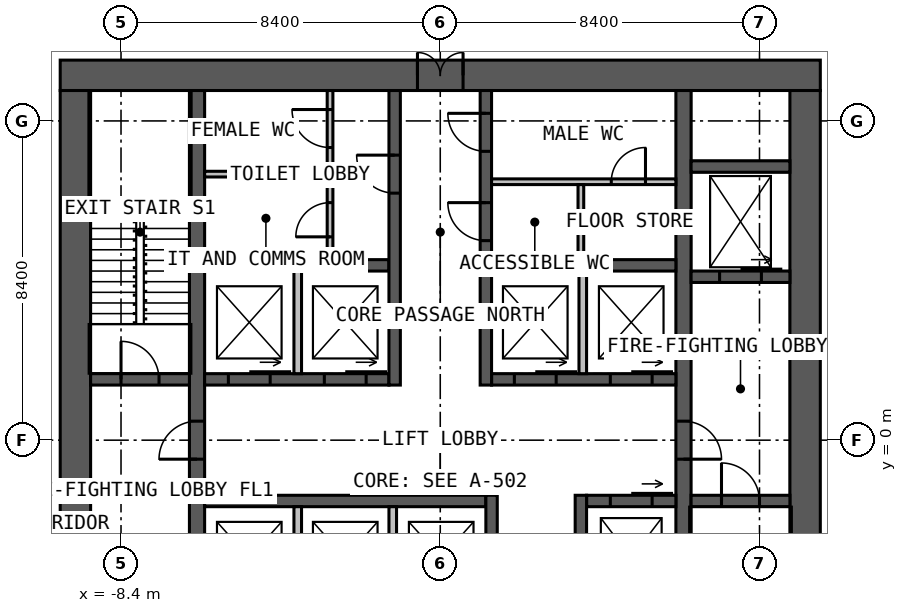
"""IFC4 building model, lengths in metres.
Left out: names, types, materials, properties, quantities, classifications, styles, units other than length and angle.
Written with IfcOpenShell. Run it as: python <this file> out.ifc"""

import sys

from ifc_helpers import new_model, si_unit, direction, frame, frame_2d, origin, place, context, subcontext, project, spatial, rectangle, extrude, element, fill, save


model = new_model("IFC4")
c1 = context("Model", 3, precision=1e-05, world=origin(), true_north=direction((0.0, 1.0)))
c2 = subcontext(c1, "Body", "Model", "MODEL_VIEW")
j1 = project(units=[si_unit("LENGTHUNIT", "METRE"), si_unit("PLANEANGLEUNIT", "RADIAN")], contexts=[c1])
p1 = place(None, origin())
s1 = spatial("IfcSite", under=j1, at=p1, CompositionType="ELEMENT")
p2 = place(p1, origin())
s2 = spatial("IfcBuilding", under=s1, at=p2, CompositionType="ELEMENT")
p3 = place(p2, frame((0.0, 0.0, 25.0)))
s3 = spatial("IfcBuildingStorey", under=s2, at=p3, CompositionType="ELEMENT", Elevation=25.0)
p4 = place(p3, frame((-10.0, 9.6, 0.0), z_axis=(0.0, 0.0, 1.0), x_axis=(1.0, 0.0, 0.0)))
e1 = element("IfcWall", 1, at=p4, inside=s3, PredefinedType="SOLIDWALL", context=c2, shape_type="SweptSolid", body=[
    extrude(rectangle(XDim=20.0, YDim=0.8, at=frame_2d((10.0, 0.0))), origin(), (0.0, 0.0, 1.0), 4.0),
])
p5 = place(p4, frame((9.4, 0.0, 0.0)))
e2 = element("IfcOpeningElement", 2, at=p5, cuts=e1, PredefinedType="OPENING", context=c2, shape_type="SweptSolid", body=[
    extrude(rectangle(XDim=1.2, YDim=2.2, at=frame_2d((0.6, 1.1))), frame((0.0, 0.41, 0.0), z_axis=(0.0, -1.0, 0.0), x_axis=(1.0, 0.0, 0.0)), (0.0, 0.0, 1.0), 0.82),
])
for number, where, z_axis, x_axis in (
    (3, (9.6, -9.2, 0.0), (0.0, 0.0, 1.0), (0.0, 1.0, 0.0)),
    (4, (-9.6, 9.2, 0.0), (0.0, 0.0, 1.0), (0.0, -1.0, 0.0)),
):
    element("IfcWall", number, at=place(p3, frame(where, z_axis=z_axis, x_axis=x_axis)), inside=s3, PredefinedType="SOLIDWALL", context=c2, shape_type="SweptSolid", body=[
        extrude(rectangle(XDim=18.4, YDim=0.8, at=frame_2d((9.2, 0.0))), origin(), (0.0, 0.0, 1.0), 4.0),
    ])
p6 = place(p3, frame((-6.4, -9.2, 0.0), z_axis=(0.0, 0.0, 1.0), x_axis=(0.0, 1.0, 0.0)))
e5 = element("IfcWall", 5, at=p6, inside=s3, PredefinedType="SOLIDWALL", context=c2, shape_type="SweptSolid", body=[
    extrude(rectangle(XDim=18.4, YDim=0.4, at=frame_2d((9.2, 0.0))), origin(), (0.0, 0.0, 1.0), 4.0),
])
p7 = place(p6, frame((8.7, 0.0, 0.0)))
e6 = element("IfcOpeningElement", 6, at=p7, cuts=e5, PredefinedType="OPENING", context=c2, shape_type="SweptSolid", body=[
    extrude(rectangle(XDim=1.0, YDim=2.2, at=frame_2d((0.5, 1.1))), frame((0.0, 0.21, 0.0), z_axis=(0.0, -1.0, 0.0), x_axis=(1.0, 0.0, 0.0)), (0.0, 0.0, 1.0), 0.42),
])
p8 = place(p3, frame((6.4, 9.2, 0.0), z_axis=(0.0, 0.0, 1.0), x_axis=(0.0, -1.0, 0.0)))
e7 = element("IfcWall", 7, at=p8, inside=s3, PredefinedType="SOLIDWALL", context=c2, shape_type="SweptSolid", body=[
    extrude(rectangle(XDim=18.4, YDim=0.4, at=frame_2d((9.2, 0.0))), origin(), (0.0, 0.0, 1.0), 4.0),
])
p9 = place(p8, frame((8.7, 0.0, 0.0)))
e8 = element("IfcOpeningElement", 8, at=p9, cuts=e7, PredefinedType="OPENING", context=c2, shape_type="SweptSolid", body=[
    extrude(rectangle(XDim=1.0, YDim=2.2, at=frame_2d((0.5, 1.1))), frame((0.0, 0.21, 0.0), z_axis=(0.0, -1.0, 0.0), x_axis=(1.0, 0.0, 0.0)), (0.0, 0.0, 1.0), 0.42),
])
p10 = place(p3, frame((-6.2, 1.6, 0.0), z_axis=(0.0, 0.0, 1.0), x_axis=(1.0, 0.0, 0.0)))
e9 = element("IfcWall", 9, at=p10, inside=s3, PredefinedType="SOLIDWALL", context=c2, shape_type="SweptSolid", body=[
    extrude(rectangle(XDim=4.85, YDim=0.3, at=frame_2d((2.425, 0.0))), origin(), (0.0, 0.0, 1.0), 4.0),
])
p11 = place(p10, frame((0.625, 0.0, 0.0)))
e10 = element("IfcOpeningElement", 10, at=p11, cuts=e9, PredefinedType="OPENING", context=c2, shape_type="SweptSolid", body=[
    extrude(rectangle(XDim=1.1, YDim=2.2, at=frame_2d((0.55, 1.1))), frame((0.0, 0.16, 0.0), z_axis=(0.0, -1.0, 0.0), x_axis=(1.0, 0.0, 0.0)), (0.0, 0.0, 1.0), 0.32),
])
p12 = place(p10, frame((3.15, 0.0, 0.0)))
e11 = element("IfcOpeningElement", 11, at=p12, cuts=e9, PredefinedType="OPENING", context=c2, shape_type="SweptSolid", body=[
    extrude(rectangle(XDim=1.1, YDim=2.2, at=frame_2d((0.55, 1.1))), frame((0.0, 0.16, 0.0), z_axis=(0.0, -1.0, 0.0), x_axis=(1.0, 0.0, 0.0)), (0.0, 0.0, 1.0), 0.32),
])
p13 = place(p3, frame((1.35, 1.6, 0.0), z_axis=(0.0, 0.0, 1.0), x_axis=(1.0, 0.0, 0.0)))
e12 = element("IfcWall", 12, at=p13, inside=s3, PredefinedType="SOLIDWALL", context=c2, shape_type="SweptSolid", body=[
    extrude(rectangle(XDim=4.85, YDim=0.3, at=frame_2d((2.425, 0.0))), origin(), (0.0, 0.0, 1.0), 4.0),
])
p14 = place(p13, frame((0.6, 0.0, 0.0)))
e13 = element("IfcOpeningElement", 13, at=p14, cuts=e12, PredefinedType="OPENING", context=c2, shape_type="SweptSolid", body=[
    extrude(rectangle(XDim=1.1, YDim=2.2, at=frame_2d((0.55, 1.1))), frame((0.0, 0.16, 0.0), z_axis=(0.0, -1.0, 0.0), x_axis=(1.0, 0.0, 0.0)), (0.0, 0.0, 1.0), 0.32),
])
p15 = place(p13, frame((3.125, 0.0, 0.0)))
e14 = element("IfcOpeningElement", 14, at=p15, cuts=e12, PredefinedType="OPENING", context=c2, shape_type="SweptSolid", body=[
    extrude(rectangle(XDim=1.1, YDim=2.2, at=frame_2d((0.55, 1.1))), frame((0.0, 0.16, 0.0), z_axis=(0.0, -1.0, 0.0), x_axis=(1.0, 0.0, 0.0)), (0.0, 0.0, 1.0), 0.32),
])
for number, where, z_axis, x_axis in (
    (15, (-6.2, 4.6, 0.0), (0.0, 0.0, 1.0), (1.0, 0.0, 0.0)),
    (16, (1.35, 4.6, 0.0), (0.0, 0.0, 1.0), (1.0, 0.0, 0.0)),
):
    element("IfcWall", number, at=place(p3, frame(where, z_axis=z_axis, x_axis=x_axis)), inside=s3, PredefinedType="SOLIDWALL", context=c2, shape_type="SweptSolid", body=[
        extrude(rectangle(XDim=4.85, YDim=0.3, at=frame_2d((2.425, 0.0))), origin(), (0.0, 0.0, 1.0), 4.0),
    ])
p16 = place(p3, frame((-1.2, 1.45, 0.0), z_axis=(0.0, 0.0, 1.0), x_axis=(0.0, 1.0, 0.0)))
e17 = element("IfcWall", 17, at=p16, inside=s3, PredefinedType="SOLIDWALL", context=c2, shape_type="SweptSolid", body=[
    extrude(rectangle(XDim=7.75, YDim=0.3, at=frame_2d((3.875, 0.0))), origin(), (0.0, 0.0, 1.0), 4.0),
])
p17 = place(p16, frame((5.05, 0.0, 0.0)))
e18 = element("IfcOpeningElement", 18, at=p17, cuts=e17, PredefinedType="OPENING", context=c2, shape_type="SweptSolid", body=[
    extrude(rectangle(XDim=1.0, YDim=2.2, at=frame_2d((0.5, 1.1))), frame((0.0, 0.16, 0.0), z_axis=(0.0, -1.0, 0.0), x_axis=(1.0, 0.0, 0.0)), (0.0, 0.0, 1.0), 0.32),
])
p18 = place(p3, frame((1.2, 1.45, 0.0), z_axis=(0.0, 0.0, 1.0), x_axis=(0.0, 1.0, 0.0)))
e19 = element("IfcWall", 19, at=p18, inside=s3, PredefinedType="SOLIDWALL", context=c2, shape_type="SweptSolid", body=[
    extrude(rectangle(XDim=7.75, YDim=0.3, at=frame_2d((3.875, 0.0))), origin(), (0.0, 0.0, 1.0), 4.0),
])
p19 = place(p18, frame((3.8, 0.0, 0.0)))
e20 = element("IfcOpeningElement", 20, at=p19, cuts=e19, PredefinedType="OPENING", context=c2, shape_type="SweptSolid", body=[
    extrude(rectangle(XDim=1.0, YDim=2.2, at=frame_2d((0.5, 1.1))), frame((0.0, 0.16, 0.0), z_axis=(0.0, -1.0, 0.0), x_axis=(1.0, 0.0, 0.0)), (0.0, 0.0, 1.0), 0.32),
])
p20 = place(p18, frame((6.15, 0.0, 0.0)))
e21 = element("IfcOpeningElement", 21, at=p20, cuts=e19, PredefinedType="OPENING", context=c2, shape_type="SweptSolid", body=[
    extrude(rectangle(XDim=1.0, YDim=2.2, at=frame_2d((0.5, 1.1))), frame((0.0, 0.16, 0.0), z_axis=(0.0, -1.0, 0.0), x_axis=(1.0, 0.0, 0.0)), (0.0, 0.0, 1.0), 0.32),
])
p21 = place(p3, frame((-6.2, -1.6, 0.0), z_axis=(0.0, 0.0, 1.0), x_axis=(1.0, 0.0, 0.0)))
e22 = element("IfcWall", 22, at=p21, inside=s3, PredefinedType="SOLIDWALL", context=c2, shape_type="SweptSolid", body=[
    extrude(rectangle(XDim=7.4, YDim=0.3, at=frame_2d((3.7, 0.0))), origin(), (0.0, 0.0, 1.0), 4.0),
])
p22 = place(p3, frame((3.85, -1.6, 0.0), z_axis=(0.0, 0.0, 1.0), x_axis=(1.0, 0.0, 0.0)))
e23 = element("IfcWall", 23, at=p22, inside=s3, PredefinedType="SOLIDWALL", context=c2, shape_type="SweptSolid", body=[
    extrude(rectangle(XDim=2.35, YDim=0.3, at=frame_2d((1.175, 0.0))), origin(), (0.0, 0.0, 1.0), 4.0),
])
p23 = place(p22, frame((0.625, 0.0, 0.0)))
e24 = element("IfcOpeningElement", 24, at=p23, cuts=e23, PredefinedType="OPENING", context=c2, shape_type="SweptSolid", body=[
    extrude(rectangle(XDim=1.1, YDim=2.2, at=frame_2d((0.55, 1.1))), frame((0.0, 0.16, 0.0), z_axis=(0.0, -1.0, 0.0), x_axis=(1.0, 0.0, 0.0)), (0.0, 0.0, 1.0), 0.32),
])
p24 = place(p3, frame((1.35, -1.45, 0.0), z_axis=(0.0, 0.0, 1.0), x_axis=(0.0, -1.0, 0.0)))
e25 = element("IfcWall", 25, at=p24, inside=s3, PredefinedType="SOLIDWALL", context=c2, shape_type="SweptSolid", body=[
    extrude(rectangle(XDim=7.75, YDim=0.3, at=frame_2d((3.875, 0.0))), origin(), (0.0, 0.0, 1.0), 4.0),
])
p25 = place(p24, frame((5.8, 0.0, 0.0)))
e26 = element("IfcOpeningElement", 26, at=p25, cuts=e25, PredefinedType="OPENING", context=c2, shape_type="SweptSolid", body=[
    extrude(rectangle(XDim=1.0, YDim=2.2, at=frame_2d((0.5, 1.1))), frame((0.0, 0.16, 0.0), z_axis=(0.0, -1.0, 0.0), x_axis=(1.0, 0.0, 0.0)), (0.0, 0.0, 1.0), 0.32),
])
p26 = place(p24, frame((3.525, 0.0, 0.0)))
e27 = element("IfcOpeningElement", 27, at=p26, cuts=e25, PredefinedType="OPENING", context=c2, shape_type="SweptSolid", body=[
    extrude(rectangle(XDim=0.9, YDim=2.2, at=frame_2d((0.45, 1.1))), frame((0.0, 0.16, 0.0), z_axis=(0.0, -1.0, 0.0), x_axis=(1.0, 0.0, 0.0)), (0.0, 0.0, 1.0), 0.32),
])
p27 = place(p3, frame((3.7, -1.45, 0.0), z_axis=(0.0, 0.0, 1.0), x_axis=(0.0, -1.0, 0.0)))
e28 = element("IfcWall", 28, at=p27, inside=s3, PredefinedType="SOLIDWALL", context=c2, shape_type="SweptSolid", body=[
    extrude(rectangle(XDim=7.75, YDim=0.3, at=frame_2d((3.875, 0.0))), origin(), (0.0, 0.0, 1.0), 4.0),
])
p28 = place(p27, frame((5.1, 0.0, 0.0)))
e29 = element("IfcOpeningElement", 29, at=p28, cuts=e28, PredefinedType="OPENING", context=c2, shape_type="SweptSolid", body=[
    extrude(rectangle(XDim=0.9, YDim=2.2, at=frame_2d((0.45, 1.1))), frame((0.0, 0.16, 0.0), z_axis=(0.0, -1.0, 0.0), x_axis=(1.0, 0.0, 0.0)), (0.0, 0.0, 1.0), 0.32),
])
p29 = place(p3, frame((-9.2, 1.6, 0.0), z_axis=(0.0, 0.0, 1.0), x_axis=(1.0, 0.0, 0.0)))
e30 = element("IfcWall", 30, at=p29, inside=s3, PredefinedType="SOLIDWALL", context=c2, shape_type="SweptSolid", body=[
    extrude(rectangle(XDim=2.6, YDim=0.3, at=frame_2d((1.3, 0.0))), origin(), (0.0, 0.0, 1.0), 4.0),
])
p30 = place(p29, frame((0.8, 0.0, 0.0)))
e31 = element("IfcOpeningElement", 31, at=p30, cuts=e30, PredefinedType="OPENING", context=c2, shape_type="SweptSolid", body=[
    extrude(rectangle(XDim=1.0, YDim=2.2, at=frame_2d((0.5, 1.1))), frame((0.0, 0.16, 0.0), z_axis=(0.0, -1.0, 0.0), x_axis=(1.0, 0.0, 0.0)), (0.0, 0.0, 1.0), 0.32),
])
p31 = place(p3, frame((6.6, -1.6, 0.0), z_axis=(0.0, 0.0, 1.0), x_axis=(1.0, 0.0, 0.0)))
e32 = element("IfcWall", 32, at=p31, inside=s3, PredefinedType="SOLIDWALL", context=c2, shape_type="SweptSolid", body=[
    extrude(rectangle(XDim=2.6, YDim=0.3, at=frame_2d((1.3, 0.0))), origin(), (0.0, 0.0, 1.0), 4.0),
])
p32 = place(p31, frame((0.8, 0.0, 0.0)))
e33 = element("IfcOpeningElement", 33, at=p32, cuts=e32, PredefinedType="OPENING", context=c2, shape_type="SweptSolid", body=[
    extrude(rectangle(XDim=1.0, YDim=2.2, at=frame_2d((0.5, 1.1))), frame((0.0, 0.16, 0.0), z_axis=(0.0, -1.0, 0.0), x_axis=(1.0, 0.0, 0.0)), (0.0, 0.0, 1.0), 0.32),
])
p33 = place(p3, frame((6.6, 4.3, 0.0), z_axis=(0.0, 0.0, 1.0), x_axis=(1.0, 0.0, 0.0)))
e34 = element("IfcWall", 34, at=p33, inside=s3, PredefinedType="SOLIDWALL", context=c2, shape_type="SweptSolid", body=[
    extrude(rectangle(XDim=2.6, YDim=0.3, at=frame_2d((1.3, 0.0))), origin(), (0.0, 0.0, 1.0), 4.0),
])
p34 = place(p33, frame((0.75, 0.0, 0.0)))
e35 = element("IfcOpeningElement", 35, at=p34, cuts=e34, PredefinedType="OPENING", context=c2, shape_type="SweptSolid", body=[
    extrude(rectangle(XDim=1.1, YDim=2.2, at=frame_2d((0.55, 1.1))), frame((0.0, 0.16, 0.0), z_axis=(0.0, -1.0, 0.0), x_axis=(1.0, 0.0, 0.0)), (0.0, 0.0, 1.0), 0.32),
])
p35 = place(p3, frame((6.6, 7.2, 0.0), z_axis=(0.0, 0.0, 1.0), x_axis=(1.0, 0.0, 0.0)))
e36 = element("IfcWall", 36, at=p35, inside=s3, PredefinedType="SOLIDWALL", context=c2, shape_type="SweptSolid", body=[
    extrude(rectangle(XDim=2.6, YDim=0.3, at=frame_2d((1.3, 0.0))), origin(), (0.0, 0.0, 1.0), 4.0),
])
for number, where, z_axis, x_axis in (
    (37, (-3.75, 1.75, 0.0), (0.0, 0.0, 1.0), (0.0, 1.0, 0.0)),
    (38, (3.75, 1.75, 0.0), (0.0, 0.0, 1.0), (0.0, 1.0, 0.0)),
    (39, (-3.75, -1.75, 0.0), (0.0, 0.0, 1.0), (0.0, -1.0, 0.0)),
    (40, (-1.25, -1.75, 0.0), (0.0, 0.0, 1.0), (0.0, -1.0, 0.0)),
):
    element("IfcWall", number, at=place(p3, frame(where, z_axis=z_axis, x_axis=x_axis)), inside=s3, PredefinedType="SOLIDWALL", context=c2, shape_type="SweptSolid", body=[
        extrude(rectangle(XDim=2.7, YDim=0.2, at=frame_2d((1.35, 0.0))), origin(), (0.0, 0.0, 1.0), 3.75),
    ])
p36 = place(p3, frame((1.35, 6.8, 0.0), z_axis=(0.0, 0.0, 1.0), x_axis=(1.0, 0.0, 0.0)))
e41 = element("IfcWall", 41, at=p36, inside=s3, PredefinedType="PARTITIONING", context=c2, shape_type="SweptSolid", body=[
    extrude(rectangle(XDim=4.85, YDim=0.15, at=frame_2d((2.425, 0.0))), origin(), (0.0, 0.0, 1.0), 3.75),
])
p37 = place(p36, frame((3.15, 0.0, 0.0)))
e42 = element("IfcOpeningElement", 42, at=p37, cuts=e41, PredefinedType="OPENING", context=c2, shape_type="SweptSolid", body=[
    extrude(rectangle(XDim=0.9, YDim=2.2, at=frame_2d((0.45, 1.1))), frame((0.0, 0.085, 0.0), z_axis=(0.0, -1.0, 0.0), x_axis=(1.0, 0.0, 0.0)), (0.0, 0.0, 1.0), 0.17),
])
p38 = place(p3, frame((3.7, 4.75, 0.0), z_axis=(0.0, 0.0, 1.0), x_axis=(0.0, 1.0, 0.0)))
e43 = element("IfcWall", 43, at=p38, inside=s3, PredefinedType="PARTITIONING", context=c2, shape_type="SweptSolid", body=[
    extrude(rectangle(XDim=1.975, YDim=0.15, at=frame_2d((0.988, 0.0))), origin(), (0.0, 0.0, 1.0), 3.75),
])
p39 = place(p3, frame((-2.9, 4.75, 0.0), z_axis=(0.0, 0.0, 1.0), x_axis=(0.0, 1.0, 0.0)))
e44 = element("IfcWall", 44, at=p39, inside=s3, PredefinedType="PARTITIONING", context=c2, shape_type="SweptSolid", body=[
    extrude(rectangle(XDim=4.45, YDim=0.15, at=frame_2d((2.225, 0.0))), origin(), (0.0, 0.0, 1.0), 3.75),
])
p40 = place(p39, frame((2.95, 0.0, 0.0)))
e45 = element("IfcOpeningElement", 45, at=p40, cuts=e44, PredefinedType="OPENING", context=c2, shape_type="SweptSolid", body=[
    extrude(rectangle(XDim=1.0, YDim=2.2, at=frame_2d((0.5, 1.1))), frame((0.0, 0.085, 0.0), z_axis=(0.0, -1.0, 0.0), x_axis=(1.0, 0.0, 0.0)), (0.0, 0.0, 1.0), 0.17),
])
p41 = place(p39, frame((0.6, 0.0, 0.0)))
e46 = element("IfcOpeningElement", 46, at=p41, cuts=e44, PredefinedType="OPENING", context=c2, shape_type="SweptSolid", body=[
    extrude(rectangle(XDim=0.9, YDim=2.2, at=frame_2d((0.45, 1.1))), frame((0.0, 0.085, 0.0), z_axis=(0.0, -1.0, 0.0), x_axis=(1.0, 0.0, 0.0)), (0.0, 0.0, 1.0), 0.17),
])
p42 = place(p3, frame((-6.2, 7.0, 0.0), z_axis=(0.0, 0.0, 1.0), x_axis=(1.0, 0.0, 0.0)))
e47 = element("IfcWall", 47, at=p42, inside=s3, PredefinedType="PARTITIONING", context=c2, shape_type="SweptSolid", body=[
    extrude(rectangle(XDim=3.225, YDim=0.15, at=frame_2d((1.612, 0.0))), origin(), (0.0, 0.0, 1.0), 3.75),
])
p43 = place(p5, origin())
e48 = element("IfcDoor", 48, at=p43, inside=s3, OperationType="DOUBLE_DOOR_SINGLE_SWING", PredefinedType="DOOR", context=c2, shape_type="SweptSolid", body=[
    extrude(rectangle(XDim=1.2, YDim=2.2, at=frame_2d((0.6, 1.1))), frame((0.0, 0.025, 0.0), z_axis=(0.0, -1.0, 0.0), x_axis=(1.0, 0.0, 0.0)), (0.0, 0.0, 1.0), 0.05),
])
fill(e2, e48)
p44 = place(p7, origin())
e49 = element("IfcDoor", 49, at=p44, inside=s3, OperationType="SINGLE_SWING_LEFT", PredefinedType="DOOR", context=c2, shape_type="SweptSolid", body=[
    extrude(rectangle(XDim=1.0, YDim=2.2, at=frame_2d((0.5, 1.1))), frame((0.0, 0.025, 0.0), z_axis=(0.0, -1.0, 0.0), x_axis=(1.0, 0.0, 0.0)), (0.0, 0.0, 1.0), 0.05),
])
fill(e6, e49)
p45 = place(p9, origin())
e50 = element("IfcDoor", 50, at=p45, inside=s3, OperationType="SINGLE_SWING_RIGHT", PredefinedType="DOOR", context=c2, shape_type="SweptSolid", body=[
    extrude(rectangle(XDim=1.0, YDim=2.2, at=frame_2d((0.5, 1.1))), frame((0.0, 0.025, 0.0), z_axis=(0.0, -1.0, 0.0), x_axis=(1.0, 0.0, 0.0)), (0.0, 0.0, 1.0), 0.05),
])
fill(e8, e50)
p46 = place(p30, origin())
e51 = element("IfcDoor", 51, at=p46, inside=s3, OperationType="SINGLE_SWING_LEFT", PredefinedType="DOOR", context=c2, shape_type="SweptSolid", body=[
    extrude(rectangle(XDim=1.0, YDim=2.2, at=frame_2d((0.5, 1.1))), frame((0.0, 0.025, 0.0), z_axis=(0.0, -1.0, 0.0), x_axis=(1.0, 0.0, 0.0)), (0.0, 0.0, 1.0), 0.05),
])
fill(e31, e51)
p47 = place(p32, origin())
e52 = element("IfcDoor", 52, at=p47, inside=s3, OperationType="SINGLE_SWING_LEFT", PredefinedType="DOOR", context=c2, shape_type="SweptSolid", body=[
    extrude(rectangle(XDim=1.0, YDim=2.2, at=frame_2d((0.5, 1.1))), frame((0.0, 0.025, 0.0), z_axis=(0.0, -1.0, 0.0), x_axis=(1.0, 0.0, 0.0)), (0.0, 0.0, 1.0), 0.05),
])
fill(e33, e52)
p48 = place(p17, origin())
e53 = element("IfcDoor", 53, at=p48, inside=s3, OperationType="SINGLE_SWING_RIGHT", PredefinedType="DOOR", context=c2, shape_type="SweptSolid", body=[
    extrude(rectangle(XDim=1.0, YDim=2.2, at=frame_2d((0.5, 1.1))), frame((0.0, 0.025, 0.0), z_axis=(0.0, -1.0, 0.0), x_axis=(1.0, 0.0, 0.0)), (0.0, 0.0, 1.0), 0.05),
])
fill(e18, e53)
p49 = place(p19, origin())
e54 = element("IfcDoor", 54, at=p49, inside=s3, OperationType="SINGLE_SWING_RIGHT", PredefinedType="DOOR", context=c2, shape_type="SweptSolid", body=[
    extrude(rectangle(XDim=1.0, YDim=2.2, at=frame_2d((0.5, 1.1))), frame((0.0, 0.025, 0.0), z_axis=(0.0, -1.0, 0.0), x_axis=(1.0, 0.0, 0.0)), (0.0, 0.0, 1.0), 0.05),
])
fill(e20, e54)
p50 = place(p20, origin())
e55 = element("IfcDoor", 55, at=p50, inside=s3, OperationType="SINGLE_SWING_RIGHT", PredefinedType="DOOR", context=c2, shape_type="SweptSolid", body=[
    extrude(rectangle(XDim=1.0, YDim=2.2, at=frame_2d((0.5, 1.1))), frame((0.0, 0.025, 0.0), z_axis=(0.0, -1.0, 0.0), x_axis=(1.0, 0.0, 0.0)), (0.0, 0.0, 1.0), 0.05),
])
fill(e21, e55)
p51 = place(p37, origin())
e56 = element("IfcDoor", 56, at=p51, inside=s3, OperationType="SINGLE_SWING_RIGHT", PredefinedType="DOOR", context=c2, shape_type="SweptSolid", body=[
    extrude(rectangle(XDim=0.9, YDim=2.2, at=frame_2d((0.45, 1.1))), frame((0.0, 0.025, 0.0), z_axis=(0.0, -1.0, 0.0), x_axis=(1.0, 0.0, 0.0)), (0.0, 0.0, 1.0), 0.05),
])
fill(e42, e56)
p52 = place(p40, origin())
e57 = element("IfcDoor", 57, at=p52, inside=s3, OperationType="SINGLE_SWING_RIGHT", PredefinedType="DOOR", context=c2, shape_type="SweptSolid", body=[
    extrude(rectangle(XDim=1.0, YDim=2.2, at=frame_2d((0.5, 1.1))), frame((0.0, 0.025, 0.0), z_axis=(0.0, -1.0, 0.0), x_axis=(1.0, 0.0, 0.0)), (0.0, 0.0, 1.0), 0.05),
])
fill(e45, e57)
p53 = place(p41, origin())
e58 = element("IfcDoor", 58, at=p53, inside=s3, OperationType="SINGLE_SWING_LEFT", PredefinedType="DOOR", context=c2, shape_type="SweptSolid", body=[
    extrude(rectangle(XDim=0.9, YDim=2.2, at=frame_2d((0.45, 1.1))), frame((0.0, 0.025, 0.0), z_axis=(0.0, -1.0, 0.0), x_axis=(1.0, 0.0, 0.0)), (0.0, 0.0, 1.0), 0.05),
])
fill(e46, e58)
p54 = place(p11, origin())
e59 = element("IfcDoor", 59, at=p54, inside=s3, OperationType="SLIDING_TO_LEFT", PredefinedType="DOOR", context=c2, shape_type="SweptSolid", body=[
    extrude(rectangle(XDim=1.1, YDim=2.2, at=frame_2d((0.55, 1.1))), frame((0.0, 0.025, 0.0), z_axis=(0.0, -1.0, 0.0), x_axis=(1.0, 0.0, 0.0)), (0.0, 0.0, 1.0), 0.05),
])
fill(e10, e59)
p55 = place(p12, origin())
e60 = element("IfcDoor", 60, at=p55, inside=s3, OperationType="SLIDING_TO_LEFT", PredefinedType="DOOR", context=c2, shape_type="SweptSolid", body=[
    extrude(rectangle(XDim=1.1, YDim=2.2, at=frame_2d((0.55, 1.1))), frame((0.0, 0.025, 0.0), z_axis=(0.0, -1.0, 0.0), x_axis=(1.0, 0.0, 0.0)), (0.0, 0.0, 1.0), 0.05),
])
fill(e11, e60)
p56 = place(p14, origin())
e61 = element("IfcDoor", 61, at=p56, inside=s3, OperationType="SLIDING_TO_LEFT", PredefinedType="DOOR", context=c2, shape_type="SweptSolid", body=[
    extrude(rectangle(XDim=1.1, YDim=2.2, at=frame_2d((0.55, 1.1))), frame((0.0, 0.025, 0.0), z_axis=(0.0, -1.0, 0.0), x_axis=(1.0, 0.0, 0.0)), (0.0, 0.0, 1.0), 0.05),
])
fill(e13, e61)
p57 = place(p15, origin())
e62 = element("IfcDoor", 62, at=p57, inside=s3, OperationType="SLIDING_TO_LEFT", PredefinedType="DOOR", context=c2, shape_type="SweptSolid", body=[
    extrude(rectangle(XDim=1.1, YDim=2.2, at=frame_2d((0.55, 1.1))), frame((0.0, 0.025, 0.0), z_axis=(0.0, -1.0, 0.0), x_axis=(1.0, 0.0, 0.0)), (0.0, 0.0, 1.0), 0.05),
])
fill(e14, e62)
p58 = place(p23, origin())
e63 = element("IfcDoor", 63, at=p58, inside=s3, OperationType="SLIDING_TO_LEFT", PredefinedType="DOOR", context=c2, shape_type="SweptSolid", body=[
    extrude(rectangle(XDim=1.1, YDim=2.2, at=frame_2d((0.55, 1.1))), frame((0.0, 0.025, 0.0), z_axis=(0.0, -1.0, 0.0), x_axis=(1.0, 0.0, 0.0)), (0.0, 0.0, 1.0), 0.05),
])
fill(e24, e63)
p59 = place(p34, origin())
e64 = element("IfcDoor", 64, at=p59, inside=s3, OperationType="SLIDING_TO_LEFT", PredefinedType="DOOR", context=c2, shape_type="SweptSolid", body=[
    extrude(rectangle(XDim=1.1, YDim=2.2, at=frame_2d((0.55, 1.1))), frame((0.0, 0.025, 0.0), z_axis=(0.0, -1.0, 0.0), x_axis=(1.0, 0.0, 0.0)), (0.0, 0.0, 1.0), 0.05),
])
fill(e35, e64)
save(model, sys.argv[1])
